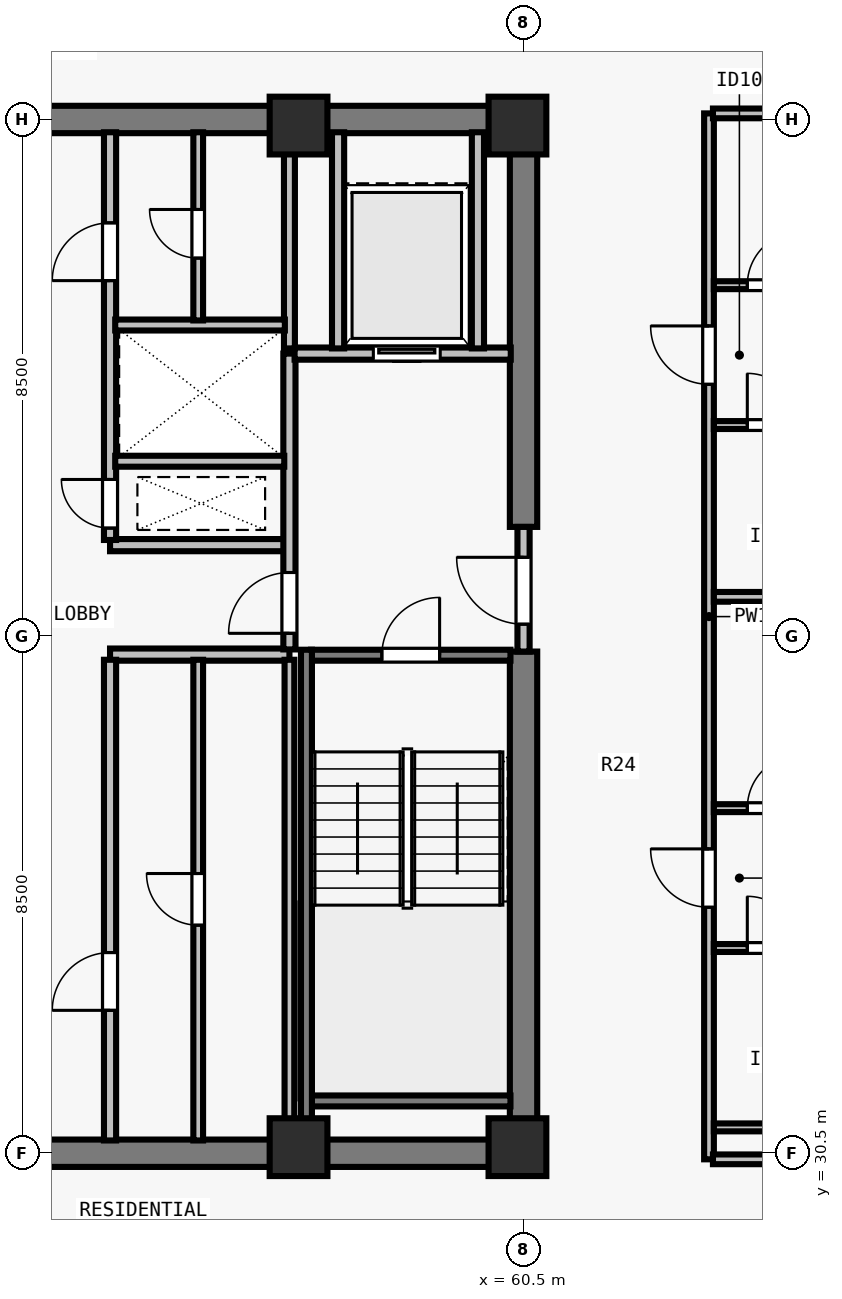
"""IFC4 building model, lengths in metres.
Left out: names, types, materials, properties, quantities, classifications, styles, units other than length and angle.
Written with IfcOpenShell. Run it as: python <this file> out.ifc"""

import sys

from ifc_helpers import new_model, si_unit, direction, frame, frame_2d, origin, origin_2d, place, context, subcontext, project, spatial, rectangle, extrude, element, fill, save


model = new_model("IFC4")
c1 = context("Model", 3, precision=1e-05, world=origin(), true_north=direction((0.0, 1.0)))
c2 = subcontext(c1, "Body", "Model", "MODEL_VIEW")
j1 = project(units=[si_unit("LENGTHUNIT", "METRE"), si_unit("PLANEANGLEUNIT", "RADIAN")], contexts=[c1])
p1 = place(None, origin())
s1 = spatial("IfcSite", under=j1, at=p1, CompositionType="ELEMENT")
p2 = place(p1, origin())
s2 = spatial("IfcBuilding", under=s1, at=p2, CompositionType="ELEMENT")
p3 = place(p2, frame((0.0, 0.0, 258.5)))
s3 = spatial("IfcBuildingStorey", under=s2, at=p3, CompositionType="ELEMENT", Elevation=258.5)
for number, where, z_axis, x_axis in (
    (1, (56.8, 30.6, 0.0), (0.0, 0.0, 1.0), (1.0, 0.0, 0.0)),
    (2, (60.4, 30.6, 0.0), (0.0, 0.0, 1.0), (1.0, 0.0, 0.0)),
    (3, (56.8, 47.4, 0.0), (0.0, 0.0, 1.0), (1.0, 0.0, 0.0)),
    (4, (60.4, 47.4, 0.0), (0.0, 0.0, 1.0), (1.0, 0.0, 0.0)),
):
    element("IfcColumn", number, at=place(p3, frame(where, z_axis=z_axis, x_axis=x_axis)), inside=s3, PredefinedType="COLUMN", context=c2, shape_type="SweptSolid", body=[
        extrude(rectangle(XDim=0.95, YDim=0.95, at=origin_2d()), origin(), (0.0, 0.0, 1.0), 3.5),
    ])
for number, where, z_axis, x_axis in (
    (5, (43.275, 30.5, 0.0), (0.0, 0.0, 1.0), (1.0, 0.0, 0.0)),
    (6, (43.275, 47.5, 0.0), (0.0, 0.0, 1.0), (1.0, 0.0, 0.0)),
):
    element("IfcWall", number, at=place(p3, frame(where, z_axis=z_axis, x_axis=x_axis)), inside=s3, PredefinedType="SHEAR", context=c2, shape_type="SweptSolid", body=[
        extrude(rectangle(XDim=17.45, YDim=0.45, at=frame_2d((8.725, 0.0))), origin(), (0.0, 0.0, 1.0), 3.29),
    ])
p4 = place(p3, frame((60.5, 30.715, 0.0), z_axis=(0.0, 0.0, 1.0), x_axis=(0.0, 1.0, 0.0)))
e7 = element("IfcWall", 7, at=p4, inside=s3, PredefinedType="SHEAR", context=c2, shape_type="SweptSolid", body=[
    extrude(rectangle(XDim=8.035, YDim=0.45, at=frame_2d((4.018, 0.0))), origin(), (0.0, 0.0, 1.0), 3.29),
])
p5 = place(p3, frame((60.5, 40.8, 0.0), z_axis=(0.0, 0.0, 1.0), x_axis=(0.0, 1.0, 0.0)))
e8 = element("IfcWall", 8, at=p5, inside=s3, PredefinedType="SHEAR", context=c2, shape_type="SweptSolid", body=[
    extrude(rectangle(XDim=6.485, YDim=0.45, at=frame_2d((3.242, 0.0))), origin(), (0.0, 0.0, 1.0), 3.29),
])
for number, where, z_axis, x_axis in (
    (9, (53.7, 38.7, 0.0), (0.0, 0.0, 1.0), (1.0, 0.0, 0.0)),
    (10, (53.7, 40.5, 0.0), (0.0, 0.0, 1.0), (1.0, 0.0, 0.0)),
):
    element("IfcWall", number, at=place(p3, frame(where, z_axis=z_axis, x_axis=x_axis)), inside=s3, PredefinedType="SOLIDWALL", context=c2, shape_type="SweptSolid", body=[
        extrude(rectangle(XDim=2.95, YDim=0.2, at=frame_2d((1.475, 0.0))), origin(), (0.0, 0.0, 1.0), 3.29),
    ])
p6 = place(p3, frame((53.7, 30.71, 0.0), z_axis=(0.0, 0.0, 1.0), x_axis=(0.0, 1.0, 0.0)))
e11 = element("IfcWall", 11, at=p6, inside=s3, PredefinedType="SOLIDWALL", context=c2, shape_type="SweptSolid", body=[
    extrude(rectangle(XDim=7.905, YDim=0.2, at=frame_2d((3.953, 0.0))), origin(), (0.0, 0.0, 1.0), 3.29),
])
p7 = place(p6, frame((2.14, 0.0, 0.0)))
e12 = element("IfcOpeningElement", 12, at=p7, cuts=e11, PredefinedType="OPENING", context=c2, shape_type="SweptSolid", body=[
    extrude(rectangle(XDim=0.95, YDim=2.12, at=frame_2d((0.475, 1.06))), frame((0.0, 0.11, 0.0), z_axis=(0.0, -1.0, 0.0), x_axis=(1.0, 0.0, 0.0)), (0.0, 0.0, 1.0), 0.22),
])
p8 = place(p3, frame((53.7, 40.585, 0.0), z_axis=(0.0, 0.0, 1.0), x_axis=(0.0, 1.0, 0.0)))
e13 = element("IfcWall", 13, at=p8, inside=s3, PredefinedType="SOLIDWALL", context=c2, shape_type="SweptSolid", body=[
    extrude(rectangle(XDim=6.705, YDim=0.2, at=frame_2d((3.353, 0.0))), origin(), (0.0, 0.0, 1.0), 3.29),
])
p9 = place(p8, frame((0.195, 0.0, 0.0)))
e14 = element("IfcOpeningElement", 14, at=p9, cuts=e13, PredefinedType="OPENING", context=c2, shape_type="SweptSolid", body=[
    extrude(rectangle(XDim=0.8, YDim=2.08, at=frame_2d((0.4, 1.04))), frame((0.0, 0.11, 0.0), z_axis=(0.0, -1.0, 0.0), x_axis=(1.0, 0.0, 0.0)), (0.0, 0.0, 1.0), 0.22),
])
p10 = place(p8, frame((4.265, 0.0, 0.0)))
e15 = element("IfcOpeningElement", 15, at=p10, cuts=e13, PredefinedType="OPENING", context=c2, shape_type="SweptSolid", body=[
    extrude(rectangle(XDim=0.95, YDim=2.12, at=frame_2d((0.475, 1.06))), frame((0.0, 0.11, 0.0), z_axis=(0.0, -1.0, 0.0), x_axis=(1.0, 0.0, 0.0)), (0.0, 0.0, 1.0), 0.22),
])
p11 = place(p3, frame((60.5, 38.75, 0.0), z_axis=(0.0, 0.0, 1.0), x_axis=(0.0, 1.0, 0.0)))
e16 = element("IfcWall", 16, at=p11, inside=s3, PredefinedType="SOLIDWALL", context=c2, shape_type="SweptSolid", body=[
    extrude(rectangle(XDim=2.05, YDim=0.2, at=frame_2d((1.025, 0.0))), origin(), (0.0, 0.0, 1.0), 3.29),
])
p12 = place(p11, frame((0.45, 0.0, 0.0)))
e17 = element("IfcOpeningElement", 17, at=p12, cuts=e16, PredefinedType="OPENING", context=c2, shape_type="SweptSolid", body=[
    extrude(rectangle(XDim=1.1, YDim=2.15, at=frame_2d((0.55, 1.075))), frame((0.0, 0.11, 0.0), z_axis=(0.0, -1.0, 0.0), x_axis=(1.0, 0.0, 0.0)), (0.0, 0.0, 1.0), 0.22),
])
p13 = place(p3, frame((56.65, 38.785, 0.0), z_axis=(0.0, 0.0, 1.0), x_axis=(0.0, 1.0, 0.0)))
e18 = element("IfcWall", 18, at=p13, inside=s3, PredefinedType="SOLIDWALL", context=c2, shape_type="SweptSolid", body=[
    extrude(rectangle(XDim=4.865, YDim=0.2, at=frame_2d((2.433, 0.0))), origin(), (0.0, 0.0, 1.0), 3.29),
])
p14 = place(p13, frame((0.265, 0.0, 0.0)))
e19 = element("IfcOpeningElement", 19, at=p14, cuts=e18, PredefinedType="OPENING", context=c2, shape_type="SweptSolid", body=[
    extrude(rectangle(XDim=1.0, YDim=2.15, at=frame_2d((0.5, 1.075))), frame((0.0, 0.11, 0.0), z_axis=(0.0, -1.0, 0.0), x_axis=(1.0, 0.0, 0.0)), (0.0, 0.0, 1.0), 0.22),
])
p15 = place(p3, frame((56.735, 43.65, 0.0), z_axis=(0.0, 0.0, 1.0), x_axis=(1.0, 0.0, 0.0)))
e20 = element("IfcWall", 20, at=p15, inside=s3, PredefinedType="SOLIDWALL", context=c2, shape_type="SweptSolid", body=[
    extrude(rectangle(XDim=3.555, YDim=0.2, at=frame_2d((1.777, 0.0))), origin(), (0.0, 0.0, 1.0), 3.29),
])
p16 = place(p15, frame((1.295, 0.0, 0.0)))
e21 = element("IfcOpeningElement", 21, at=p16, cuts=e20, PredefinedType="OPENING", context=c2, shape_type="SweptSolid", body=[
    extrude(rectangle(XDim=1.1, YDim=2.2, at=frame_2d((0.55, 1.1))), frame((0.0, 0.11, 0.0), z_axis=(0.0, -1.0, 0.0), x_axis=(1.0, 0.0, 0.0)), (0.0, 0.0, 1.0), 0.22),
])
for number, where, z_axis, x_axis in (
    (22, (57.45, 43.735, 0.0), (0.0, 0.0, 1.0), (0.0, 1.0, 0.0)),
    (23, (59.75, 43.735, 0.0), (0.0, 0.0, 1.0), (0.0, 1.0, 0.0)),
):
    element("IfcWall", number, at=place(p3, frame(where, z_axis=z_axis, x_axis=x_axis)), inside=s3, PredefinedType="SOLIDWALL", context=c2, shape_type="SweptSolid", body=[
        extrude(rectangle(XDim=3.555, YDim=0.2, at=frame_2d((1.777, 0.0))), origin(), (0.0, 0.0, 1.0), 3.29),
    ])
p17 = place(p3, frame((56.65, 30.71, 0.0), z_axis=(0.0, 0.0, 1.0), x_axis=(0.0, 1.0, 0.0)))
e24 = element("IfcWall", 24, at=p17, inside=s3, PredefinedType="PARTITIONING", context=c2, shape_type="SweptSolid", body=[
    extrude(rectangle(XDim=7.905, YDim=0.16, at=frame_2d((3.953, 0.0))), origin(), (0.0, 0.0, 1.0), 3.29),
])
p18 = place(p3, frame((55.15, 30.71, 0.0), z_axis=(0.0, 0.0, 1.0), x_axis=(0.0, 1.0, 0.0)))
e25 = element("IfcWall", 25, at=p18, inside=s3, PredefinedType="PARTITIONING", context=c2, shape_type="SweptSolid", body=[
    extrude(rectangle(XDim=7.905, YDim=0.16, at=frame_2d((3.953, 0.0))), origin(), (0.0, 0.0, 1.0), 3.29),
])
p19 = place(p18, frame((3.54, 0.0, 0.0)))
e26 = element("IfcOpeningElement", 26, at=p19, cuts=e25, PredefinedType="OPENING", context=c2, shape_type="SweptSolid", body=[
    extrude(rectangle(XDim=0.85, YDim=2.12, at=frame_2d((0.425, 1.06))), frame((0.0, 0.09, 0.0), z_axis=(0.0, -1.0, 0.0), x_axis=(1.0, 0.0, 0.0)), (0.0, 0.0, 1.0), 0.18),
])
p20 = place(p3, frame((56.65, 43.735, 0.0), z_axis=(0.0, 0.0, 1.0), x_axis=(0.0, 1.0, 0.0)))
e27 = element("IfcWall", 27, at=p20, inside=s3, PredefinedType="SOLIDWALL", context=c2, shape_type="SweptSolid", body=[
    extrude(rectangle(XDim=3.555, YDim=0.18, at=frame_2d((1.777, 0.0))), origin(), (0.0, 0.0, 1.0), 3.29),
])
p21 = place(p3, frame((53.785, 41.88, 0.0), z_axis=(0.0, 0.0, 1.0), x_axis=(1.0, 0.0, 0.0)))
e28 = element("IfcWall", 28, at=p21, inside=s3, PredefinedType="SOLIDWALL", context=c2, shape_type="SweptSolid", body=[
    extrude(rectangle(XDim=2.78, YDim=0.18, at=frame_2d((1.39, 0.0))), origin(), (0.0, 0.0, 1.0), 3.29),
])
p22 = place(p3, frame((53.785, 44.12, 0.0), z_axis=(0.0, 0.0, 1.0), x_axis=(1.0, 0.0, 0.0)))
e29 = element("IfcWall", 29, at=p22, inside=s3, PredefinedType="SOLIDWALL", context=c2, shape_type="SweptSolid", body=[
    extrude(rectangle(XDim=2.79, YDim=0.18, at=frame_2d((1.395, 0.0))), origin(), (0.0, 0.0, 1.0), 3.29),
])
p23 = place(p3, frame((55.15, 44.195, 0.0), z_axis=(0.0, 0.0, 1.0), x_axis=(0.0, 1.0, 0.0)))
e30 = element("IfcWall", 30, at=p23, inside=s3, PredefinedType="PARTITIONING", context=c2, shape_type="SweptSolid", body=[
    extrude(rectangle(XDim=3.095, YDim=0.16, at=frame_2d((1.547, 0.0))), origin(), (0.0, 0.0, 1.0), 3.29),
])
p24 = place(p23, frame((1.025, 0.0, 0.0)))
e31 = element("IfcOpeningElement", 31, at=p24, cuts=e30, PredefinedType="OPENING", context=c2, shape_type="SweptSolid", body=[
    extrude(rectangle(XDim=0.8, YDim=2.1, at=frame_2d((0.4, 1.05))), frame((0.0, 0.09, 0.0), z_axis=(0.0, -1.0, 0.0), x_axis=(1.0, 0.0, 0.0)), (0.0, 0.0, 1.0), 0.18),
])
p25 = place(p3, frame((63.55, 30.4, 0.0), z_axis=(0.0, 0.0, 1.0), x_axis=(0.0, 1.0, 0.0)))
e32 = element("IfcWall", 32, at=p25, inside=s3, PredefinedType="PARTITIONING", context=c2, shape_type="SweptSolid", body=[
    extrude(rectangle(XDim=17.2, YDim=0.16, at=frame_2d((8.6, 0.0))), origin(), (0.0, 0.0, 1.0), 3.29),
])
p26 = place(p25, frame((4.145, 0.0, 0.0)))
e33 = element("IfcOpeningElement", 33, at=p26, cuts=e32, PredefinedType="OPENING", context=c2, shape_type="SweptSolid", body=[
    extrude(rectangle(XDim=0.96, YDim=2.18, at=frame_2d((0.48, 1.09))), frame((0.0, 0.09, 0.0), z_axis=(0.0, -1.0, 0.0), x_axis=(1.0, 0.0, 0.0)), (0.0, 0.0, 1.0), 0.18),
])
p27 = place(p25, frame((12.745, 0.0, 0.0)))
e34 = element("IfcOpeningElement", 34, at=p27, cuts=e32, PredefinedType="OPENING", context=c2, shape_type="SweptSolid", body=[
    extrude(rectangle(XDim=0.96, YDim=2.18, at=frame_2d((0.48, 1.09))), frame((0.0, 0.09, 0.0), z_axis=(0.0, -1.0, 0.0), x_axis=(1.0, 0.0, 0.0)), (0.0, 0.0, 1.0), 0.18),
])
for number, where, z_axis, x_axis in (
    (35, (63.615, 30.4, 0.0), (0.0, 0.0, 1.0), (1.0, 0.0, 0.0)),
    (36, (63.615, 47.6, 0.0), (0.0, 0.0, 1.0), (1.0, 0.0, 0.0)),
):
    element("IfcWall", number, at=place(p3, frame(where, z_axis=z_axis, x_axis=x_axis)), inside=s3, PredefinedType="PARTITIONING", context=c2, shape_type="SweptSolid", body=[
        extrude(rectangle(XDim=10.58, YDim=0.16, at=frame_2d((5.29, 0.0))), origin(), (0.0, 0.0, 1.0), 3.29),
    ])
p28 = place(p3, frame((63.63, 39.65, 0.0), z_axis=(0.0, 0.0, 1.0), x_axis=(1.0, 0.0, 0.0)))
e37 = element("IfcWall", 37, at=p28, inside=s3, PredefinedType="PARTITIONING", context=c2, shape_type="SweptSolid", body=[
    extrude(rectangle(XDim=10.565, YDim=0.16, at=frame_2d((5.283, 0.0))), origin(), (0.0, 0.0, 1.0), 3.29),
])
p29 = place(p3, frame((63.63, 30.925, 0.0), z_axis=(0.0, 0.0, 1.0), x_axis=(1.0, 0.0, 0.0)))
e38 = element("IfcWall", 38, at=p29, inside=s3, PredefinedType="PLUMBINGWALL", context=c2, shape_type="SweptSolid", body=[
    extrude(rectangle(XDim=2.75, YDim=0.13, at=frame_2d((1.375, 0.0))), origin(), (0.0, 0.0, 1.0), 3.29),
])
p30 = place(p3, frame((63.63, 33.875, 0.0), z_axis=(0.0, 0.0, 1.0), x_axis=(1.0, 0.0, 0.0)))
e39 = element("IfcWall", 39, at=p30, inside=s3, PredefinedType="PLUMBINGWALL", context=c2, shape_type="SweptSolid", body=[
    extrude(rectangle(XDim=2.75, YDim=0.13, at=frame_2d((1.375, 0.0))), origin(), (0.0, 0.0, 1.0), 3.29),
])
p31 = place(p30, frame((0.55, 0.0, 0.0)))
e40 = element("IfcOpeningElement", 40, at=p31, cuts=e39, PredefinedType="OPENING", context=c2, shape_type="SweptSolid", body=[
    extrude(rectangle(XDim=0.85, YDim=2.08, at=frame_2d((0.425, 1.04))), frame((0.0, 0.075, 0.0), z_axis=(0.0, -1.0, 0.0), x_axis=(1.0, 0.0, 0.0)), (0.0, 0.0, 1.0), 0.15),
])
p32 = place(p3, frame((63.63, 36.175, 0.0), z_axis=(0.0, 0.0, 1.0), x_axis=(1.0, 0.0, 0.0)))
e41 = element("IfcWall", 41, at=p32, inside=s3, PredefinedType="PLUMBINGWALL", context=c2, shape_type="SweptSolid", body=[
    extrude(rectangle(XDim=2.75, YDim=0.13, at=frame_2d((1.375, 0.0))), origin(), (0.0, 0.0, 1.0), 3.29),
])
p33 = place(p32, frame((0.55, 0.0, 0.0)))
e42 = element("IfcOpeningElement", 42, at=p33, cuts=e41, PredefinedType="OPENING", context=c2, shape_type="SweptSolid", body=[
    extrude(rectangle(XDim=0.88, YDim=2.1, at=frame_2d((0.44, 1.05))), frame((0.0, 0.075, 0.0), z_axis=(0.0, -1.0, 0.0), x_axis=(1.0, 0.0, 0.0)), (0.0, 0.0, 1.0), 0.15),
])
p34 = place(p3, frame((63.63, 42.475, 0.0), z_axis=(0.0, 0.0, 1.0), x_axis=(1.0, 0.0, 0.0)))
e43 = element("IfcWall", 43, at=p34, inside=s3, PredefinedType="PLUMBINGWALL", context=c2, shape_type="SweptSolid", body=[
    extrude(rectangle(XDim=2.75, YDim=0.13, at=frame_2d((1.375, 0.0))), origin(), (0.0, 0.0, 1.0), 3.29),
])
p35 = place(p34, frame((0.55, 0.0, 0.0)))
e44 = element("IfcOpeningElement", 44, at=p35, cuts=e43, PredefinedType="OPENING", context=c2, shape_type="SweptSolid", body=[
    extrude(rectangle(XDim=0.85, YDim=2.08, at=frame_2d((0.425, 1.04))), frame((0.0, 0.075, 0.0), z_axis=(0.0, -1.0, 0.0), x_axis=(1.0, 0.0, 0.0)), (0.0, 0.0, 1.0), 0.15),
])
p36 = place(p3, frame((63.63, 44.775, 0.0), z_axis=(0.0, 0.0, 1.0), x_axis=(1.0, 0.0, 0.0)))
e45 = element("IfcWall", 45, at=p36, inside=s3, PredefinedType="PLUMBINGWALL", context=c2, shape_type="SweptSolid", body=[
    extrude(rectangle(XDim=2.75, YDim=0.13, at=frame_2d((1.375, 0.0))), origin(), (0.0, 0.0, 1.0), 3.29),
])
p37 = place(p36, frame((0.55, 0.0, 0.0)))
e46 = element("IfcOpeningElement", 46, at=p37, cuts=e45, PredefinedType="OPENING", context=c2, shape_type="SweptSolid", body=[
    extrude(rectangle(XDim=0.88, YDim=2.1, at=frame_2d((0.44, 1.05))), frame((0.0, 0.075, 0.0), z_axis=(0.0, -1.0, 0.0), x_axis=(1.0, 0.0, 0.0)), (0.0, 0.0, 1.0), 0.15),
])
p38 = place(p3, frame((57.005, 38.69, 0.0), z_axis=(0.0, 0.0, 1.0), x_axis=(1.0, 0.0, 0.0)))
e47 = element("IfcWall", 47, at=p38, inside=s3, PredefinedType="SOLIDWALL", context=c2, shape_type="SweptSolid", body=[
    extrude(rectangle(XDim=3.28, YDim=0.18, at=frame_2d((1.64, 0.0))), origin(), (0.0, 0.0, 1.0), 3.29),
])
p39 = place(p38, frame((1.165, 0.0, 0.0)))
e48 = element("IfcOpeningElement", 48, at=p39, cuts=e47, PredefinedType="OPENING", context=c2, shape_type="SweptSolid", body=[
    extrude(rectangle(XDim=0.95, YDim=2.15, at=frame_2d((0.475, 1.075))), frame((0.0, 0.1, 0.0), z_axis=(0.0, -1.0, 0.0), x_axis=(1.0, 0.0, 0.0)), (0.0, 0.0, 1.0), 0.2),
])
p40 = place(p3, frame((57.005, 31.36, 0.0), z_axis=(0.0, 0.0, 1.0), x_axis=(1.0, 0.0, 0.0)))
e49 = element("IfcWall", 49, at=p40, inside=s3, PredefinedType="SOLIDWALL", context=c2, shape_type="SweptSolid", body=[
    extrude(rectangle(XDim=3.28, YDim=0.18, at=frame_2d((1.64, 0.0))), origin(), (0.0, 0.0, 1.0), 3.29),
])
p41 = place(p3, frame((56.93, 38.78, 0.0), z_axis=(0.0, 0.0, 1.0), x_axis=(0.0, -1.0, 0.0)))
e50 = element("IfcWall", 50, at=p41, inside=s3, PredefinedType="SOLIDWALL", context=c2, shape_type="SweptSolid", body=[
    extrude(rectangle(XDim=8.067, YDim=0.18, at=frame_2d((4.034, 0.0))), origin(), (0.0, 0.0, 1.0), 3.29),
])
p42 = place(p12, origin())
e51 = element("IfcDoor", 51, at=p42, inside=s3, OperationType="SINGLE_SWING_RIGHT", PredefinedType="DOOR", context=c2, shape_type="SweptSolid", body=[
    extrude(rectangle(XDim=1.1, YDim=2.15, at=frame_2d((0.55, 1.075))), frame((0.0, 0.025, 0.0), z_axis=(0.0, -1.0, 0.0), x_axis=(1.0, 0.0, 0.0)), (0.0, 0.0, 1.0), 0.05),
])
fill(e17, e51)
p43 = place(p14, origin())
e52 = element("IfcDoor", 52, at=p43, inside=s3, OperationType="SINGLE_SWING_LEFT", PredefinedType="DOOR", context=c2, shape_type="SweptSolid", body=[
    extrude(rectangle(XDim=1.0, YDim=2.15, at=frame_2d((0.5, 1.075))), frame((0.0, 0.025, 0.0), z_axis=(0.0, -1.0, 0.0), x_axis=(1.0, 0.0, 0.0)), (0.0, 0.0, 1.0), 0.05),
])
fill(e19, e52)
p44 = place(p16, origin())
e53 = element("IfcDoor", 53, at=p44, inside=s3, OperationType="SLIDING_TO_LEFT", PredefinedType="DOOR", context=c2, shape_type="SweptSolid", body=[
    extrude(rectangle(XDim=1.1, YDim=2.2, at=frame_2d((0.55, 1.1))), frame((0.0, 0.025, 0.0), z_axis=(0.0, -1.0, 0.0), x_axis=(1.0, 0.0, 0.0)), (0.0, 0.0, 1.0), 0.05),
])
fill(e21, e53)
p45 = place(p7, origin())
e54 = element("IfcDoor", 54, at=p45, inside=s3, OperationType="SINGLE_SWING_LEFT", PredefinedType="DOOR", context=c2, shape_type="SweptSolid", body=[
    extrude(rectangle(XDim=0.95, YDim=2.12, at=frame_2d((0.475, 1.06))), frame((0.0, 0.025, 0.0), z_axis=(0.0, -1.0, 0.0), x_axis=(1.0, 0.0, 0.0)), (0.0, 0.0, 1.0), 0.05),
])
fill(e12, e54)
p46 = place(p19, origin())
e55 = element("IfcDoor", 55, at=p46, inside=s3, OperationType="SINGLE_SWING_RIGHT", PredefinedType="DOOR", context=c2, shape_type="SweptSolid", body=[
    extrude(rectangle(XDim=0.85, YDim=2.12, at=frame_2d((0.425, 1.06))), frame((0.0, 0.025, 0.0), z_axis=(0.0, -1.0, 0.0), x_axis=(1.0, 0.0, 0.0)), (0.0, 0.0, 1.0), 0.05),
])
fill(e26, e55)
p47 = place(p9, origin())
e56 = element("IfcDoor", 56, at=p47, inside=s3, OperationType="SINGLE_SWING_RIGHT", PredefinedType="DOOR", context=c2, shape_type="SweptSolid", body=[
    extrude(rectangle(XDim=0.8, YDim=2.08, at=frame_2d((0.4, 1.04))), frame((0.0, 0.025, 0.0), z_axis=(0.0, -1.0, 0.0), x_axis=(1.0, 0.0, 0.0)), (0.0, 0.0, 1.0), 0.05),
])
fill(e14, e56)
p48 = place(p10, origin())
e57 = element("IfcDoor", 57, at=p48, inside=s3, OperationType="SINGLE_SWING_LEFT", PredefinedType="DOOR", context=c2, shape_type="SweptSolid", body=[
    extrude(rectangle(XDim=0.95, YDim=2.12, at=frame_2d((0.475, 1.06))), frame((0.0, 0.025, 0.0), z_axis=(0.0, -1.0, 0.0), x_axis=(1.0, 0.0, 0.0)), (0.0, 0.0, 1.0), 0.05),
])
fill(e15, e57)
p49 = place(p24, origin())
e58 = element("IfcDoor", 58, at=p49, inside=s3, OperationType="SINGLE_SWING_RIGHT", PredefinedType="DOOR", context=c2, shape_type="SweptSolid", body=[
    extrude(rectangle(XDim=0.8, YDim=2.1, at=frame_2d((0.4, 1.05))), frame((0.0, 0.025, 0.0), z_axis=(0.0, -1.0, 0.0), x_axis=(1.0, 0.0, 0.0)), (0.0, 0.0, 1.0), 0.05),
])
fill(e31, e58)
p50 = place(p31, origin())
e59 = element("IfcDoor", 59, at=p50, inside=s3, OperationType="SINGLE_SWING_LEFT", PredefinedType="DOOR", context=c2, shape_type="SweptSolid", body=[
    extrude(rectangle(XDim=0.85, YDim=2.08, at=frame_2d((0.425, 1.04))), frame((0.0, 0.025, 0.0), z_axis=(0.0, -1.0, 0.0), x_axis=(1.0, 0.0, 0.0)), (0.0, 0.0, 1.0), 0.05),
])
fill(e40, e59)
p51 = place(p33, origin())
e60 = element("IfcDoor", 60, at=p51, inside=s3, OperationType="SINGLE_SWING_RIGHT", PredefinedType="DOOR", context=c2, shape_type="SweptSolid", body=[
    extrude(rectangle(XDim=0.88, YDim=2.1, at=frame_2d((0.44, 1.05))), frame((0.0, 0.025, 0.0), z_axis=(0.0, -1.0, 0.0), x_axis=(1.0, 0.0, 0.0)), (0.0, 0.0, 1.0), 0.05),
])
fill(e42, e60)
p52 = place(p26, origin())
e61 = element("IfcDoor", 61, at=p52, inside=s3, OperationType="SINGLE_SWING_RIGHT", PredefinedType="DOOR", context=c2, shape_type="SweptSolid", body=[
    extrude(rectangle(XDim=0.96, YDim=2.18, at=frame_2d((0.48, 1.09))), frame((0.0, 0.025, 0.0), z_axis=(0.0, -1.0, 0.0), x_axis=(1.0, 0.0, 0.0)), (0.0, 0.0, 1.0), 0.05),
])
fill(e33, e61)
p53 = place(p35, origin())
e62 = element("IfcDoor", 62, at=p53, inside=s3, OperationType="SINGLE_SWING_LEFT", PredefinedType="DOOR", context=c2, shape_type="SweptSolid", body=[
    extrude(rectangle(XDim=0.85, YDim=2.08, at=frame_2d((0.425, 1.04))), frame((0.0, 0.025, 0.0), z_axis=(0.0, -1.0, 0.0), x_axis=(1.0, 0.0, 0.0)), (0.0, 0.0, 1.0), 0.05),
])
fill(e44, e62)
p54 = place(p37, origin())
e63 = element("IfcDoor", 63, at=p54, inside=s3, OperationType="SINGLE_SWING_RIGHT", PredefinedType="DOOR", context=c2, shape_type="SweptSolid", body=[
    extrude(rectangle(XDim=0.88, YDim=2.1, at=frame_2d((0.44, 1.05))), frame((0.0, 0.025, 0.0), z_axis=(0.0, -1.0, 0.0), x_axis=(1.0, 0.0, 0.0)), (0.0, 0.0, 1.0), 0.05),
])
fill(e46, e63)
p55 = place(p27, origin())
e64 = element("IfcDoor", 64, at=p55, inside=s3, OperationType="SINGLE_SWING_RIGHT", PredefinedType="DOOR", context=c2, shape_type="SweptSolid", body=[
    extrude(rectangle(XDim=0.96, YDim=2.18, at=frame_2d((0.48, 1.09))), frame((0.0, 0.025, 0.0), z_axis=(0.0, -1.0, 0.0), x_axis=(1.0, 0.0, 0.0)), (0.0, 0.0, 1.0), 0.05),
])
fill(e34, e64)
p56 = place(p39, origin())
e65 = element("IfcDoor", 65, at=p56, inside=s3, OperationType="SINGLE_SWING_RIGHT", PredefinedType="DOOR", context=c2, shape_type="SweptSolid", body=[
    extrude(rectangle(XDim=0.95, YDim=2.15, at=frame_2d((0.475, 1.075))), frame((0.0, 0.025, 0.0), z_axis=(0.0, -1.0, 0.0), x_axis=(1.0, 0.0, 0.0)), (0.0, 0.0, 1.0), 0.05),
])
fill(e48, e65)
save(model, sys.argv[1])
